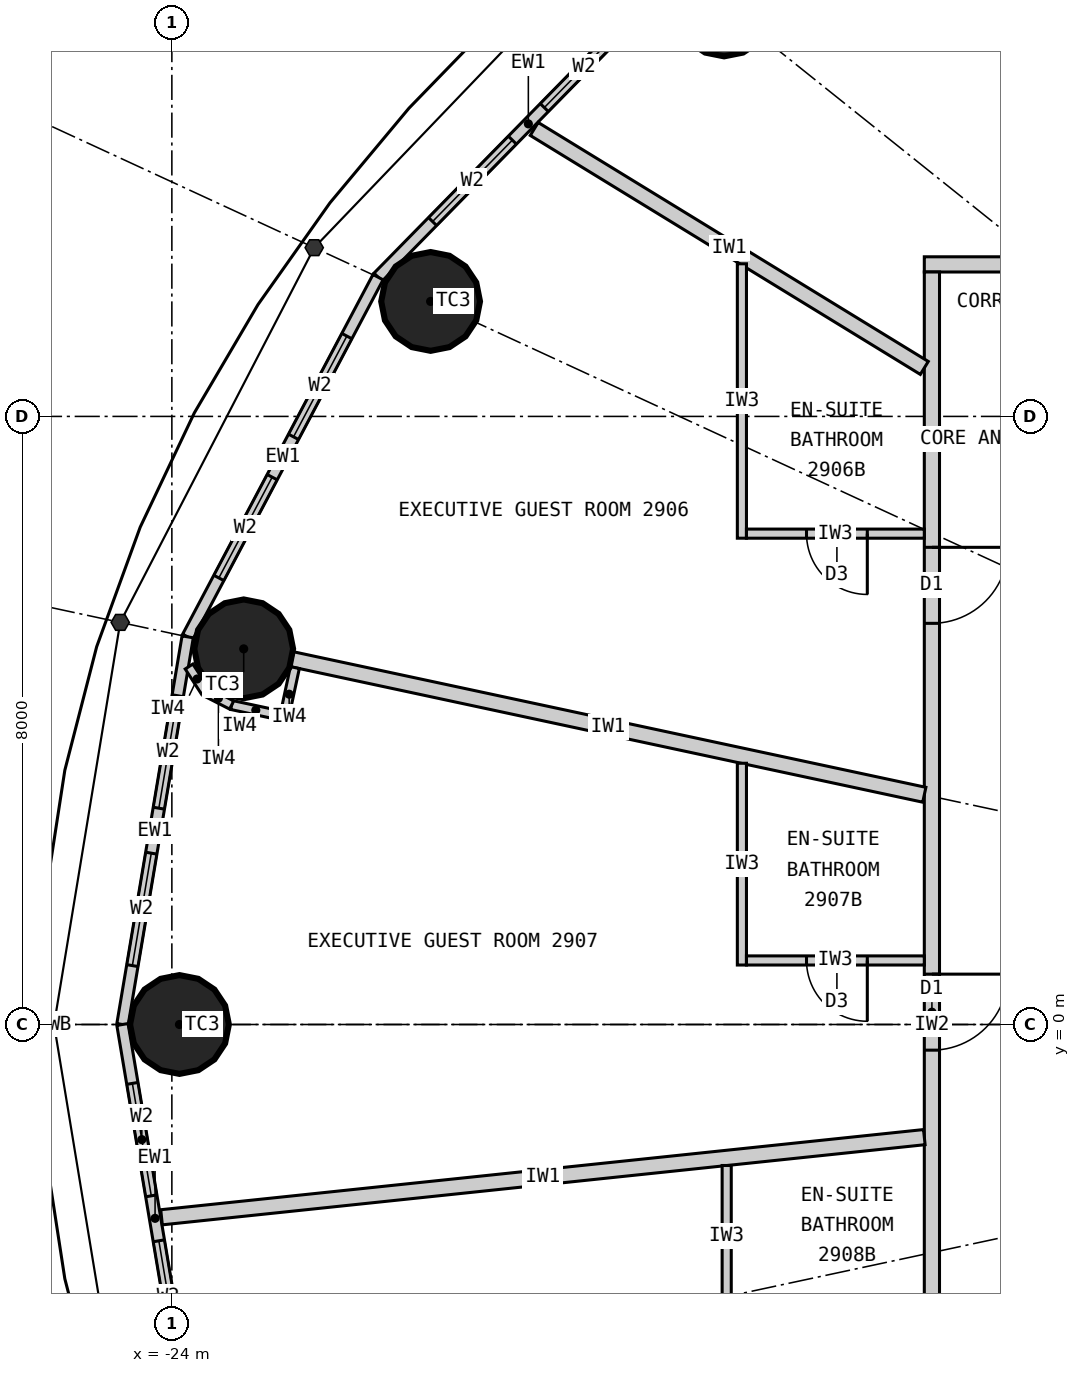
"""IFC4 building model, lengths in metres.
Left out: names, types, materials, properties, quantities, classifications, styles, units other than length and angle.
Written with IfcOpenShell. Run it as: python <this file> out.ifc"""

import sys

from ifc_helpers import new_model, si_unit, direction, frame, frame_2d, origin, origin_2d, place, context, subcontext, project, spatial, rectangle, circle, extrude, element, fill, save


model = new_model("IFC4")
c1 = context("Model", 3, precision=1e-05, world=origin(), true_north=direction((0.0, 1.0)))
c2 = subcontext(c1, "Body", "Model", "MODEL_VIEW")
j1 = project(units=[si_unit("LENGTHUNIT", "METRE"), si_unit("PLANEANGLEUNIT", "RADIAN")], contexts=[c1])
p1 = place(None, origin())
s1 = spatial("IfcSite", under=j1, at=p1, CompositionType="ELEMENT")
p2 = place(p1, origin())
s2 = spatial("IfcBuilding", under=s1, at=p2, CompositionType="ELEMENT")
p3 = place(p2, frame((0.0, 0.0, 115.5)))
s3 = spatial("IfcBuildingStorey", under=s2, at=p3, CompositionType="ELEMENT", Elevation=115.5)
for number, where, z_axis, x_axis in (
    (1, (-16.734, 13.387, 0.0), (0.0, 0.0, 1.0), (1.0, 0.0, 0.0)),
    (2, (-20.596, 9.513, 0.0), (0.0, 0.0, 1.0), (1.0, 0.0, 0.0)),
    (3, (-23.055, 4.942, 0.0), (0.0, 0.0, 1.0), (1.0, 0.0, 0.0)),
    (4, (-23.9, 0.0, 0.0), (0.0, 0.0, 1.0), (1.0, 0.0, 0.0)),
):
    element("IfcColumn", number, at=place(p3, frame(where, z_axis=z_axis, x_axis=x_axis)), inside=s3, PredefinedType="COLUMN", context=c2, shape_type="SweptSolid", body=[
        extrude(circle(Radius=0.65, at=origin_2d()), origin(), (0.0, 0.0, 1.0), 3.3),
    ])
p4 = place(p3, frame((-17.332, 13.866, 0.0), z_axis=(0.0, 0.0, 1.0), x_axis=(-0.700136650834, -0.714008872605, 0.0)))
e5 = element("IfcWall", 5, at=p4, inside=s3, PredefinedType="ELEMENTEDWALL", context=c2, shape_type="SweptSolid", body=[
    extrude(rectangle(XDim=5.649, YDim=0.15, at=frame_2d((2.825, 0.0))), origin(), (0.0, 0.0, 1.0), 3.12),
])
p5 = place(p4, frame((1.025, 0.0, 0.9)))
e6 = element("IfcOpeningElement", 6, at=p5, cuts=e5, PredefinedType="OPENING", context=c2, shape_type="SweptSolid", body=[
    extrude(rectangle(XDim=1.5, YDim=1.9, at=frame_2d((0.75, 0.95))), frame((0.0, 0.085, 0.0), z_axis=(0.0, -1.0, 0.0), x_axis=(1.0, 0.0, 0.0)), (0.0, 0.0, 1.0), 0.17),
])
p6 = place(p4, frame((3.125, 0.0, 0.9)))
e7 = element("IfcOpeningElement", 7, at=p6, cuts=e5, PredefinedType="OPENING", context=c2, shape_type="SweptSolid", body=[
    extrude(rectangle(XDim=1.5, YDim=1.9, at=frame_2d((0.75, 0.95))), frame((0.0, 0.085, 0.0), z_axis=(0.0, -1.0, 0.0), x_axis=(1.0, 0.0, 0.0)), (0.0, 0.0, 1.0), 0.17),
])
p7 = place(p3, frame((-21.287, 9.832, 0.0), z_axis=(0.0, 0.0, 1.0), x_axis=(-0.467814388454, -0.883826735257, 0.0)))
e8 = element("IfcWall", 8, at=p7, inside=s3, PredefinedType="ELEMENTEDWALL", context=c2, shape_type="SweptSolid", body=[
    extrude(rectangle(XDim=5.354, YDim=0.15, at=frame_2d((2.677, 0.0))), origin(), (0.0, 0.0, 1.0), 3.12),
])
p8 = place(p7, frame((0.877, 0.0, 0.9)))
e9 = element("IfcOpeningElement", 9, at=p8, cuts=e8, PredefinedType="OPENING", context=c2, shape_type="SweptSolid", body=[
    extrude(rectangle(XDim=1.5, YDim=1.9, at=frame_2d((0.75, 0.95))), frame((0.0, 0.085, 0.0), z_axis=(0.0, -1.0, 0.0), x_axis=(1.0, 0.0, 0.0)), (0.0, 0.0, 1.0), 0.17),
])
p9 = place(p7, frame((2.977, 0.0, 0.9)))
e10 = element("IfcOpeningElement", 10, at=p9, cuts=e8, PredefinedType="OPENING", context=c2, shape_type="SweptSolid", body=[
    extrude(rectangle(XDim=1.5, YDim=1.9, at=frame_2d((0.75, 0.95))), frame((0.0, 0.085, 0.0), z_axis=(0.0, -1.0, 0.0), x_axis=(1.0, 0.0, 0.0)), (0.0, 0.0, 1.0), 0.17),
])
p10 = place(p3, frame((-23.792, 5.1, 0.0), z_axis=(0.0, 0.0, 1.0), x_axis=(-0.165883894218, -0.986145290329, 0.0)))
e11 = element("IfcWall", 11, at=p10, inside=s3, PredefinedType="ELEMENTEDWALL", context=c2, shape_type="SweptSolid", body=[
    extrude(rectangle(XDim=5.172, YDim=0.15, at=frame_2d((2.586, 0.0))), origin(), (0.0, 0.0, 1.0), 3.12),
])
p11 = place(p10, frame((0.786, 0.0, 0.9)))
e12 = element("IfcOpeningElement", 12, at=p11, cuts=e11, PredefinedType="OPENING", context=c2, shape_type="SweptSolid", body=[
    extrude(rectangle(XDim=1.5, YDim=1.9, at=frame_2d((0.75, 0.95))), frame((0.0, 0.085, 0.0), z_axis=(0.0, -1.0, 0.0), x_axis=(1.0, 0.0, 0.0)), (0.0, 0.0, 1.0), 0.17),
])
p12 = place(p10, frame((2.886, 0.0, 0.9)))
e13 = element("IfcOpeningElement", 13, at=p12, cuts=e11, PredefinedType="OPENING", context=c2, shape_type="SweptSolid", body=[
    extrude(rectangle(XDim=1.5, YDim=1.9, at=frame_2d((0.75, 0.95))), frame((0.0, 0.085, 0.0), z_axis=(0.0, -1.0, 0.0), x_axis=(1.0, 0.0, 0.0)), (0.0, 0.0, 1.0), 0.17),
])
p13 = place(p3, frame((-24.65, 0.0, 0.0), z_axis=(0.0, 0.0, 1.0), x_axis=(0.165883894218, -0.986145290329, 0.0)))
e14 = element("IfcWall", 14, at=p13, inside=s3, PredefinedType="ELEMENTEDWALL", context=c2, shape_type="SweptSolid", body=[
    extrude(rectangle(XDim=5.172, YDim=0.15, at=frame_2d((2.586, 0.0))), origin(), (0.0, 0.0, 1.0), 3.12),
])
p14 = place(p13, frame((0.786, 0.0, 0.9)))
e15 = element("IfcOpeningElement", 15, at=p14, cuts=e14, PredefinedType="OPENING", context=c2, shape_type="SweptSolid", body=[
    extrude(rectangle(XDim=1.5, YDim=1.9, at=frame_2d((0.75, 0.95))), frame((0.0, 0.085, 0.0), z_axis=(0.0, -1.0, 0.0), x_axis=(1.0, 0.0, 0.0)), (0.0, 0.0, 1.0), 0.17),
])
p15 = place(p13, frame((2.886, 0.0, 0.9)))
e16 = element("IfcOpeningElement", 16, at=p15, cuts=e14, PredefinedType="OPENING", context=c2, shape_type="SweptSolid", body=[
    extrude(rectangle(XDim=1.5, YDim=1.9, at=frame_2d((0.75, 0.95))), frame((0.0, 0.085, 0.0), z_axis=(0.0, -1.0, 0.0), x_axis=(1.0, 0.0, 0.0)), (0.0, 0.0, 1.0), 0.17),
])
p16 = place(p3, frame((-14.1, 10.0, 0.0), z_axis=(0.0, 0.0, 1.0), x_axis=(1.0, 0.0, 0.0)))
e17 = element("IfcWall", 17, at=p16, inside=s3, PredefinedType="PARTITIONING", context=c2, shape_type="SweptSolid", body=[
    extrude(rectangle(XDim=12.535, YDim=0.2, at=frame_2d((6.268, 0.0))), origin(), (0.0, 0.0, 1.0), 3.12),
])
p17 = place(p16, frame((2.801, 0.0, 0.0)))
e18 = element("IfcOpeningElement", 18, at=p17, cuts=e17, PredefinedType="OPENING", context=c2, shape_type="SweptSolid", body=[
    extrude(rectangle(XDim=1.0, YDim=2.2, at=frame_2d((0.5, 1.1))), frame((0.0, 0.11, 0.0), z_axis=(0.0, -1.0, 0.0), x_axis=(1.0, 0.0, 0.0)), (0.0, 0.0, 1.0), 0.22),
])
p18 = place(p3, frame((-14.0, 9.9, 0.0), z_axis=(0.0, 0.0, 1.0), x_axis=(0.0, -1.0, 0.0)))
e19 = element("IfcWall", 19, at=p18, inside=s3, PredefinedType="PARTITIONING", context=c2, shape_type="SweptSolid", body=[
    extrude(rectangle(XDim=19.8, YDim=0.2, at=frame_2d((9.9, 0.0))), origin(), (0.0, 0.0, 1.0), 3.12),
])
p19 = place(p18, frame((3.622, 0.0, 0.0)))
e20 = element("IfcOpeningElement", 20, at=p19, cuts=e19, PredefinedType="OPENING", context=c2, shape_type="SweptSolid", body=[
    extrude(rectangle(XDim=1.0, YDim=2.2, at=frame_2d((0.5, 1.1))), frame((0.0, 0.11, 0.0), z_axis=(0.0, -1.0, 0.0), x_axis=(1.0, 0.0, 0.0)), (0.0, 0.0, 1.0), 0.22),
])
p20 = place(p18, frame((9.238, 0.0, 0.0)))
e21 = element("IfcOpeningElement", 21, at=p20, cuts=e19, PredefinedType="OPENING", context=c2, shape_type="SweptSolid", body=[
    extrude(rectangle(XDim=1.0, YDim=2.2, at=frame_2d((0.5, 1.1))), frame((0.0, 0.11, 0.0), z_axis=(0.0, -1.0, 0.0), x_axis=(1.0, 0.0, 0.0)), (0.0, 0.0, 1.0), 0.22),
])
p21 = place(p18, frame((13.742, 0.0, 0.0)))
e22 = element("IfcOpeningElement", 22, at=p21, cuts=e19, PredefinedType="OPENING", context=c2, shape_type="SweptSolid", body=[
    extrude(rectangle(XDim=1.0, YDim=2.2, at=frame_2d((0.5, 1.1))), frame((0.0, 0.11, 0.0), z_axis=(0.0, -1.0, 0.0), x_axis=(1.0, 0.0, 0.0)), (0.0, 0.0, 1.0), 0.22),
])
p22 = place(p18, frame((18.698, 0.0, 0.0)))
e23 = element("IfcOpeningElement", 23, at=p22, cuts=e19, PredefinedType="OPENING", context=c2, shape_type="SweptSolid", body=[
    extrude(rectangle(XDim=1.0, YDim=2.2, at=frame_2d((0.5, 1.1))), frame((0.0, 0.11, 0.0), z_axis=(0.0, -1.0, 0.0), x_axis=(1.0, 0.0, 0.0)), (0.0, 0.0, 1.0), 0.22),
])
p23 = place(p3, frame((-14.1, 8.638, 0.0), z_axis=(0.0, 0.0, 1.0), x_axis=(-0.852706758009, 0.5223898782, 0.0)))
e24 = element("IfcWall", 24, at=p23, inside=s3, PredefinedType="PARTITIONING", context=c2, shape_type="SweptSolid", body=[
    extrude(rectangle(XDim=6.019, YDim=0.2, at=frame_2d((3.009, 0.0))), origin(), (0.0, 0.0, 1.0), 3.12),
])
p24 = place(p3, frame((-14.1, 3.022, 0.0), z_axis=(0.0, 0.0, 1.0), x_axis=(-0.977783513367, 0.209617272638, 0.0)))
e25 = element("IfcWall", 25, at=p24, inside=s3, PredefinedType="PARTITIONING", context=c2, shape_type="SweptSolid", body=[
    extrude(rectangle(XDim=8.508, YDim=0.2, at=frame_2d((4.254, 0.0))), origin(), (0.0, 0.0, 1.0), 2.37),
])
p25 = place(p3, frame((-14.1, -1.482, 0.0), z_axis=(0.0, 0.0, 1.0), x_axis=(-0.994523202615, -0.104516024894, 0.0)))
e26 = element("IfcWall", 26, at=p25, inside=s3, PredefinedType="PARTITIONING", context=c2, shape_type="SweptSolid", body=[
    extrude(rectangle(XDim=10.091, YDim=0.2, at=frame_2d((5.045, 0.0))), origin(), (0.0, 0.0, 1.0), 2.47),
])
p26 = place(p3, frame((-16.5, 10.008, 0.0), z_axis=(0.0, 0.0, 1.0), x_axis=(0.0, -1.0, 0.0)))
e27 = element("IfcWall", 27, at=p26, inside=s3, PredefinedType="PARTITIONING", context=c2, shape_type="SweptSolid", body=[
    extrude(rectangle(XDim=3.61, YDim=0.12, at=frame_2d((1.805, 0.0))), origin(), (0.0, 0.0, 1.0), 3.12),
])
p27 = place(p3, frame((-14.1, 6.458, 0.0), z_axis=(0.0, 0.0, 1.0), x_axis=(-1.0, 0.0, 0.0)))
e28 = element("IfcWall", 28, at=p27, inside=s3, PredefinedType="PARTITIONING", context=c2, shape_type="SweptSolid", body=[
    extrude(rectangle(XDim=2.34, YDim=0.12, at=frame_2d((1.17, 0.0))), origin(), (0.0, 0.0, 1.0), 3.12),
])
p28 = place(p27, frame((0.75, 0.0, 0.0)))
e29 = element("IfcOpeningElement", 29, at=p28, cuts=e28, PredefinedType="OPENING", context=c2, shape_type="SweptSolid", body=[
    extrude(rectangle(XDim=0.8, YDim=2.1, at=frame_2d((0.4, 1.05))), frame((0.0, 0.07, 0.0), z_axis=(0.0, -1.0, 0.0), x_axis=(1.0, 0.0, 0.0)), (0.0, 0.0, 1.0), 0.14),
])
p29 = place(p3, frame((-16.5, 3.437, 0.0), z_axis=(0.0, 0.0, 1.0), x_axis=(0.0, -1.0, 0.0)))
e30 = element("IfcWall", 30, at=p29, inside=s3, PredefinedType="PARTITIONING", context=c2, shape_type="SweptSolid", body=[
    extrude(rectangle(XDim=2.655, YDim=0.12, at=frame_2d((1.327, 0.0))), origin(), (0.0, 0.0, 1.0), 3.12),
])
p30 = place(p3, frame((-14.1, 0.843, 0.0), z_axis=(0.0, 0.0, 1.0), x_axis=(-1.0, 0.0, 0.0)))
e31 = element("IfcWall", 31, at=p30, inside=s3, PredefinedType="PARTITIONING", context=c2, shape_type="SweptSolid", body=[
    extrude(rectangle(XDim=2.34, YDim=0.12, at=frame_2d((1.17, 0.0))), origin(), (0.0, 0.0, 1.0), 3.12),
])
p31 = place(p30, frame((0.75, 0.0, 0.0)))
e32 = element("IfcOpeningElement", 32, at=p31, cuts=e31, PredefinedType="OPENING", context=c2, shape_type="SweptSolid", body=[
    extrude(rectangle(XDim=0.8, YDim=2.1, at=frame_2d((0.4, 1.05))), frame((0.0, 0.07, 0.0), z_axis=(0.0, -1.0, 0.0), x_axis=(1.0, 0.0, 0.0)), (0.0, 0.0, 1.0), 0.14),
])
p32 = place(p3, frame((-16.7, -1.855, 0.0), z_axis=(0.0, 0.0, 1.0), x_axis=(0.0, -1.0, 0.0)))
e33 = element("IfcWall", 33, at=p32, inside=s3, PredefinedType="PARTITIONING", context=c2, shape_type="SweptSolid", body=[
    extrude(rectangle(XDim=1.867, YDim=0.12, at=frame_2d((0.933, 0.0))), origin(), (0.0, 0.0, 1.0), 3.12),
])
p33 = place(p3, frame((-22.382, 4.695, 0.0), z_axis=(0.0, 0.0, 1.0), x_axis=(-0.209808658628, -0.977742464438, 0.0)))
e34 = element("IfcWall", 34, at=p33, inside=s3, PredefinedType="PARTITIONING", context=c2, shape_type="SweptSolid", body=[
    extrude(rectangle(XDim=0.716, YDim=0.12, at=frame_2d((0.358, 0.0))), origin(), (0.0, 0.0, 1.0), 3.12),
])
p34 = place(p3, frame((-22.578, 4.067, 0.0), z_axis=(0.0, 0.0, 1.0), x_axis=(-0.977802414077, 0.209529088731, 0.0)))
e35 = element("IfcWall", 35, at=p34, inside=s3, PredefinedType="PARTITIONING", context=c2, shape_type="SweptSolid", body=[
    extrude(rectangle(XDim=0.65, YDim=0.12, at=frame_2d((0.325, 0.0))), origin(), (0.0, 0.0, 1.0), 3.12),
])
for number, where, z_axis, x_axis in (
    (36, (-23.213, 4.203, 0.0), (0.0, 0.0, 1.0), (-0.89, 0.456, 0.0)),
    (37, (-23.562, 4.381, 0.0), (0.0, 0.0, 1.0), (-0.543, 0.84, 0.0)),
):
    element("IfcWall", number, at=place(p3, frame(where, z_axis=z_axis, x_axis=x_axis)), inside=s3, PredefinedType="PARTITIONING", context=c2, shape_type="SweptSolid", body=[
        extrude(rectangle(XDim=0.391, YDim=0.12, at=frame_2d((0.196, 0.0))), origin(), (0.0, 0.0, 1.0), 3.12),
    ])
p35 = place(p5, origin())
e38 = element("IfcWindow", 38, at=p35, inside=s3, PartitioningType="SINGLE_PANEL", PredefinedType="WINDOW", context=c2, shape_type="SweptSolid", body=[
    extrude(rectangle(XDim=1.5, YDim=1.9, at=frame_2d((0.75, 0.95))), frame((0.0, 0.03, 0.0), z_axis=(0.0, -1.0, 0.0), x_axis=(1.0, 0.0, 0.0)), (0.0, 0.0, 1.0), 0.06),
])
fill(e6, e38)
p36 = place(p6, origin())
e39 = element("IfcWindow", 39, at=p36, inside=s3, PartitioningType="SINGLE_PANEL", PredefinedType="WINDOW", context=c2, shape_type="SweptSolid", body=[
    extrude(rectangle(XDim=1.5, YDim=1.9, at=frame_2d((0.75, 0.95))), frame((0.0, 0.03, 0.0), z_axis=(0.0, -1.0, 0.0), x_axis=(1.0, 0.0, 0.0)), (0.0, 0.0, 1.0), 0.06),
])
fill(e7, e39)
p37 = place(p8, origin())
e40 = element("IfcWindow", 40, at=p37, inside=s3, PartitioningType="SINGLE_PANEL", PredefinedType="WINDOW", context=c2, shape_type="SweptSolid", body=[
    extrude(rectangle(XDim=1.5, YDim=1.9, at=frame_2d((0.75, 0.95))), frame((0.0, 0.03, 0.0), z_axis=(0.0, -1.0, 0.0), x_axis=(1.0, 0.0, 0.0)), (0.0, 0.0, 1.0), 0.06),
])
fill(e9, e40)
p38 = place(p9, origin())
e41 = element("IfcWindow", 41, at=p38, inside=s3, PartitioningType="SINGLE_PANEL", PredefinedType="WINDOW", context=c2, shape_type="SweptSolid", body=[
    extrude(rectangle(XDim=1.5, YDim=1.9, at=frame_2d((0.75, 0.95))), frame((0.0, 0.03, 0.0), z_axis=(0.0, -1.0, 0.0), x_axis=(1.0, 0.0, 0.0)), (0.0, 0.0, 1.0), 0.06),
])
fill(e10, e41)
p39 = place(p11, origin())
e42 = element("IfcWindow", 42, at=p39, inside=s3, PartitioningType="SINGLE_PANEL", PredefinedType="WINDOW", context=c2, shape_type="SweptSolid", body=[
    extrude(rectangle(XDim=1.5, YDim=1.9, at=frame_2d((0.75, 0.95))), frame((0.0, 0.03, 0.0), z_axis=(0.0, -1.0, 0.0), x_axis=(1.0, 0.0, 0.0)), (0.0, 0.0, 1.0), 0.06),
])
fill(e12, e42)
p40 = place(p12, origin())
e43 = element("IfcWindow", 43, at=p40, inside=s3, PartitioningType="SINGLE_PANEL", PredefinedType="WINDOW", context=c2, shape_type="SweptSolid", body=[
    extrude(rectangle(XDim=1.5, YDim=1.9, at=frame_2d((0.75, 0.95))), frame((0.0, 0.03, 0.0), z_axis=(0.0, -1.0, 0.0), x_axis=(1.0, 0.0, 0.0)), (0.0, 0.0, 1.0), 0.06),
])
fill(e13, e43)
p41 = place(p14, origin())
e44 = element("IfcWindow", 44, at=p41, inside=s3, PartitioningType="SINGLE_PANEL", PredefinedType="WINDOW", context=c2, shape_type="SweptSolid", body=[
    extrude(rectangle(XDim=1.5, YDim=1.9, at=frame_2d((0.75, 0.95))), frame((0.0, 0.03, 0.0), z_axis=(0.0, -1.0, 0.0), x_axis=(1.0, 0.0, 0.0)), (0.0, 0.0, 1.0), 0.06),
])
fill(e15, e44)
p42 = place(p15, origin())
e45 = element("IfcWindow", 45, at=p42, inside=s3, PartitioningType="SINGLE_PANEL", PredefinedType="WINDOW", context=c2, shape_type="SweptSolid", body=[
    extrude(rectangle(XDim=1.5, YDim=1.9, at=frame_2d((0.75, 0.95))), frame((0.0, 0.03, 0.0), z_axis=(0.0, -1.0, 0.0), x_axis=(1.0, 0.0, 0.0)), (0.0, 0.0, 1.0), 0.06),
])
fill(e16, e45)
p43 = place(p28, origin())
e46 = element("IfcDoor", 46, at=p43, inside=s3, OperationType="SINGLE_SWING_LEFT", PredefinedType="DOOR", context=c2, shape_type="SweptSolid", body=[
    extrude(rectangle(XDim=0.8, YDim=2.1, at=frame_2d((0.4, 1.05))), frame((0.0, 0.025, 0.0), z_axis=(0.0, -1.0, 0.0), x_axis=(1.0, 0.0, 0.0)), (0.0, 0.0, 1.0), 0.05),
])
fill(e29, e46)
p44 = place(p19, origin())
e47 = element("IfcDoor", 47, at=p44, inside=s3, OperationType="SINGLE_SWING_LEFT", PredefinedType="DOOR", context=c2, shape_type="SweptSolid", body=[
    extrude(rectangle(XDim=1.0, YDim=2.2, at=frame_2d((0.5, 1.1))), frame((0.0, 0.025, 0.0), z_axis=(0.0, -1.0, 0.0), x_axis=(1.0, 0.0, 0.0)), (0.0, 0.0, 1.0), 0.05),
])
fill(e20, e47)
p45 = place(p31, origin())
e48 = element("IfcDoor", 48, at=p45, inside=s3, OperationType="SINGLE_SWING_LEFT", PredefinedType="DOOR", context=c2, shape_type="SweptSolid", body=[
    extrude(rectangle(XDim=0.8, YDim=2.1, at=frame_2d((0.4, 1.05))), frame((0.0, 0.025, 0.0), z_axis=(0.0, -1.0, 0.0), x_axis=(1.0, 0.0, 0.0)), (0.0, 0.0, 1.0), 0.05),
])
fill(e32, e48)
p46 = place(p20, origin())
e49 = element("IfcDoor", 49, at=p46, inside=s3, OperationType="SINGLE_SWING_LEFT", PredefinedType="DOOR", context=c2, shape_type="SweptSolid", body=[
    extrude(rectangle(XDim=1.0, YDim=2.2, at=frame_2d((0.5, 1.1))), frame((0.0, 0.025, 0.0), z_axis=(0.0, -1.0, 0.0), x_axis=(1.0, 0.0, 0.0)), (0.0, 0.0, 1.0), 0.05),
])
fill(e21, e49)
save(model, sys.argv[1])
